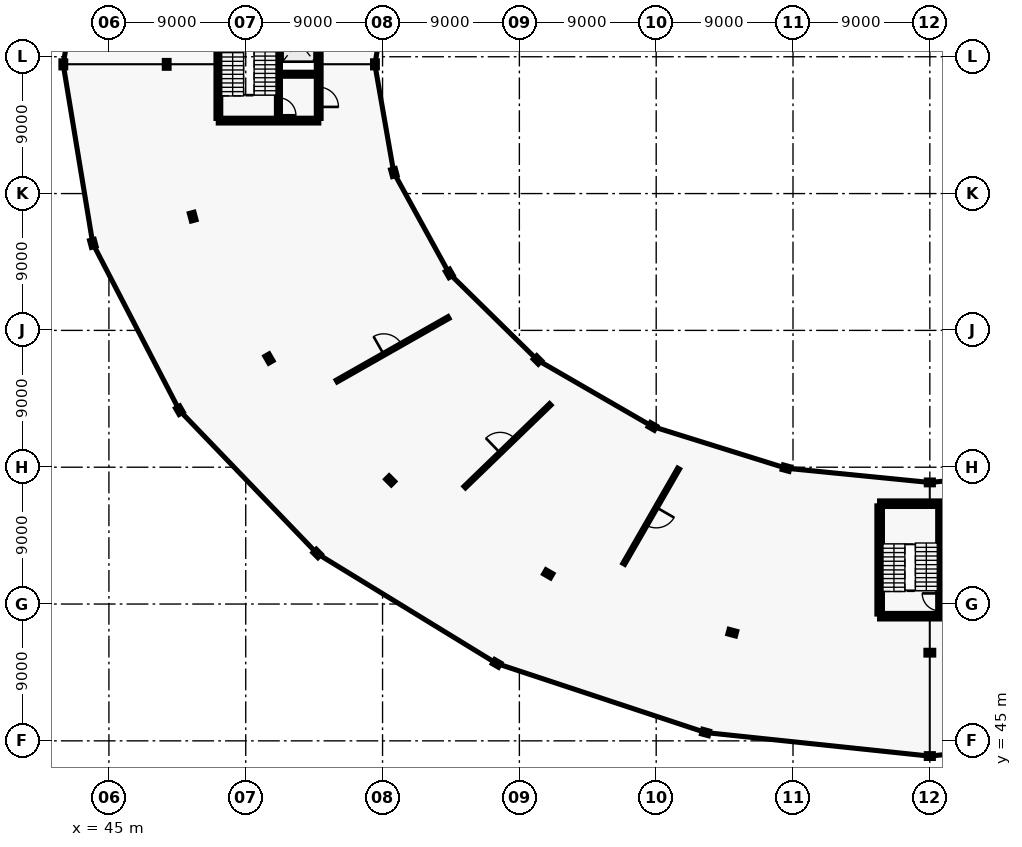
"""IFC4 building model, lengths in metres.
Left out: names, types, materials, properties, quantities, classifications, styles, units other than length and angle.
Written with IfcOpenShell. Run it as: python <this file> out.ifc"""

import sys

from ifc_helpers import new_model, si_unit, direction, frame, frame_2d, origin, origin_2d, place, context, subcontext, project, spatial, rectangle, i_section, extrude, element, fill, save


model = new_model("IFC4")
c1 = context("Model", 3, precision=1e-05, world=origin(), true_north=direction((0.0, 1.0)))
c2 = subcontext(c1, "Body", "Model", "MODEL_VIEW")
j1 = project(units=[si_unit("LENGTHUNIT", "METRE"), si_unit("PLANEANGLEUNIT", "RADIAN")], contexts=[c1])
p1 = place(None, origin())
s1 = spatial("IfcSite", under=j1, at=p1, CompositionType="ELEMENT")
p2 = place(p1, origin())
s2 = spatial("IfcBuilding", under=s1, at=p2, CompositionType="ELEMENT")
p3 = place(p2, frame((0.0, 0.0, 5.4)))
s3 = spatial("IfcBuildingStorey", under=s2, at=p3, CompositionType="ELEMENT", Elevation=5.4)
p4 = place(p3, frame((62.5, 89.5, 0.0), z_axis=(0.0, 0.0, 1.0), x_axis=(-1.0, 0.0, 0.0)))
e1 = element("IfcColumn", 1, at=p4, inside=s3, PredefinedType="COLUMN", context=c2, shape_type="SweptSolid", body=[
    extrude(i_section(OverallWidth=0.3, OverallDepth=0.45, WebThickness=0.014, FlangeThickness=0.026, FilletRadius=0.027, at=origin_2d()), origin(), (0.0, 0.0, 1.0), 4.2),
])
p5 = place(p3, frame((48.8, 89.5, 0.0), z_axis=(0.0, 0.0, 1.0), x_axis=(-1.0, 0.0, 0.0)))
e2 = element("IfcColumn", 2, at=p5, inside=s3, PredefinedType="COLUMN", context=c2, shape_type="SweptSolid", body=[
    extrude(i_section(OverallWidth=0.3, OverallDepth=0.5, WebThickness=0.014, FlangeThickness=0.028, FilletRadius=0.027, at=origin_2d()), origin(), (0.0, 0.0, 1.0), 4.2),
])
p6 = place(p3, frame((42.0, 89.5, 0.0), z_axis=(0.0, 0.0, 1.0), x_axis=(-1.0, 0.0, 0.0)))
e3 = element("IfcColumn", 3, at=p6, inside=s3, PredefinedType="COLUMN", context=c2, shape_type="SweptSolid", body=[
    extrude(i_section(OverallWidth=0.3, OverallDepth=0.45, WebThickness=0.014, FlangeThickness=0.026, FilletRadius=0.027, at=origin_2d()), origin(), (0.0, 0.0, 1.0), 4.18),
])
p7 = place(p3, frame((63.744, 82.382, 0.0), z_axis=(0.0, 0.0, 1.0), x_axis=(-0.965925826289, -0.258819045103, 0.0)))
e4 = element("IfcColumn", 4, at=p7, inside=s3, PredefinedType="COLUMN", context=c2, shape_type="SweptSolid", body=[
    extrude(i_section(OverallWidth=0.3, OverallDepth=0.45, WebThickness=0.014, FlangeThickness=0.026, FilletRadius=0.027, at=origin_2d()), origin(), (0.0, 0.0, 1.0), 4.2),
])
p8 = place(p3, frame((50.511, 79.484, 0.0), z_axis=(0.0, 0.0, 1.0), x_axis=(-0.965925826289, -0.258819045103, 0.0)))
e5 = element("IfcColumn", 5, at=p8, inside=s3, PredefinedType="COLUMN", context=c2, shape_type="SweptSolid", body=[
    extrude(i_section(OverallWidth=0.3, OverallDepth=0.5, WebThickness=0.014, FlangeThickness=0.028, FilletRadius=0.027, at=origin_2d()), origin(), (0.0, 0.0, 1.0), 4.2),
])
p9 = place(p3, frame((43.942, 77.724, 0.0), z_axis=(0.0, 0.0, 1.0), x_axis=(-0.965925826289, -0.258819045103, 0.0)))
e6 = element("IfcColumn", 6, at=p9, inside=s3, PredefinedType="COLUMN", context=c2, shape_type="SweptSolid", body=[
    extrude(i_section(OverallWidth=0.3, OverallDepth=0.45, WebThickness=0.014, FlangeThickness=0.026, FilletRadius=0.027, at=origin_2d()), origin(), (0.0, 0.0, 1.0), 4.18),
])
p10 = place(p3, frame((67.39, 75.75, 0.0), z_axis=(0.0, 0.0, 1.0), x_axis=(-0.866025403784, -0.5, 0.0)))
e7 = element("IfcColumn", 7, at=p10, inside=s3, PredefinedType="COLUMN", context=c2, shape_type="SweptSolid", body=[
    extrude(i_section(OverallWidth=0.3, OverallDepth=0.45, WebThickness=0.014, FlangeThickness=0.026, FilletRadius=0.027, at=origin_2d()), origin(), (0.0, 0.0, 1.0), 4.2),
])
p11 = place(p3, frame((55.526, 70.15, 0.0), z_axis=(0.0, 0.0, 1.0), x_axis=(-0.866025403784, -0.5, 0.0)))
e8 = element("IfcColumn", 8, at=p11, inside=s3, PredefinedType="COLUMN", context=c2, shape_type="SweptSolid", body=[
    extrude(i_section(OverallWidth=0.3, OverallDepth=0.5, WebThickness=0.014, FlangeThickness=0.028, FilletRadius=0.027, at=origin_2d()), origin(), (0.0, 0.0, 1.0), 4.2),
])
p12 = place(p3, frame((49.637, 66.75, 0.0), z_axis=(0.0, 0.0, 1.0), x_axis=(-0.866025403784, -0.5, 0.0)))
e9 = element("IfcColumn", 9, at=p12, inside=s3, PredefinedType="COLUMN", context=c2, shape_type="SweptSolid", body=[
    extrude(i_section(OverallWidth=0.3, OverallDepth=0.45, WebThickness=0.014, FlangeThickness=0.026, FilletRadius=0.027, at=origin_2d()), origin(), (0.0, 0.0, 1.0), 4.18),
])
p13 = place(p3, frame((73.191, 70.055, 0.0), z_axis=(0.0, 0.0, 1.0), x_axis=(-0.707106781187, -0.707106781187, 0.0)))
e10 = element("IfcColumn", 10, at=p13, inside=s3, PredefinedType="COLUMN", context=c2, shape_type="SweptSolid", body=[
    extrude(i_section(OverallWidth=0.3, OverallDepth=0.45, WebThickness=0.014, FlangeThickness=0.026, FilletRadius=0.027, at=origin_2d()), origin(), (0.0, 0.0, 1.0), 4.2),
])
p14 = place(p3, frame((63.503, 62.135, 0.0), z_axis=(0.0, 0.0, 1.0), x_axis=(-0.707106781187, -0.707106781187, 0.0)))
e11 = element("IfcColumn", 11, at=p14, inside=s3, PredefinedType="COLUMN", context=c2, shape_type="SweptSolid", body=[
    extrude(i_section(OverallWidth=0.3, OverallDepth=0.5, WebThickness=0.014, FlangeThickness=0.028, FilletRadius=0.027, at=origin_2d()), origin(), (0.0, 0.0, 1.0), 4.2),
])
p15 = place(p3, frame((58.695, 57.327, 0.0), z_axis=(0.0, 0.0, 1.0), x_axis=(-0.707106781187, -0.707106781187, 0.0)))
e12 = element("IfcColumn", 12, at=p15, inside=s3, PredefinedType="COLUMN", context=c2, shape_type="SweptSolid", body=[
    extrude(i_section(OverallWidth=0.3, OverallDepth=0.45, WebThickness=0.014, FlangeThickness=0.026, FilletRadius=0.027, at=origin_2d()), origin(), (0.0, 0.0, 1.0), 4.18),
])
p16 = place(p3, frame((80.75, 65.684, 0.0), z_axis=(0.0, 0.0, 1.0), x_axis=(-0.5, -0.866025403784, 0.0)))
e13 = element("IfcColumn", 13, at=p16, inside=s3, PredefinedType="COLUMN", context=c2, shape_type="SweptSolid", body=[
    extrude(i_section(OverallWidth=0.3, OverallDepth=0.45, WebThickness=0.014, FlangeThickness=0.026, FilletRadius=0.027, at=origin_2d()), origin(), (0.0, 0.0, 1.0), 4.2),
])
p17 = place(p3, frame((73.9, 55.985, 0.0), z_axis=(0.0, 0.0, 1.0), x_axis=(-0.5, -0.866025403784, 0.0)))
e14 = element("IfcColumn", 14, at=p17, inside=s3, PredefinedType="COLUMN", context=c2, shape_type="SweptSolid", body=[
    extrude(i_section(OverallWidth=0.3, OverallDepth=0.5, WebThickness=0.014, FlangeThickness=0.028, FilletRadius=0.027, at=origin_2d()), origin(), (0.0, 0.0, 1.0), 4.2),
])
p18 = place(p3, frame((70.5, 50.096, 0.0), z_axis=(0.0, 0.0, 1.0), x_axis=(-0.5, -0.866025403784, 0.0)))
e15 = element("IfcColumn", 15, at=p18, inside=s3, PredefinedType="COLUMN", context=c2, shape_type="SweptSolid", body=[
    extrude(i_section(OverallWidth=0.3, OverallDepth=0.45, WebThickness=0.014, FlangeThickness=0.026, FilletRadius=0.027, at=origin_2d()), origin(), (0.0, 0.0, 1.0), 4.18),
])
p19 = place(p3, frame((89.553, 62.937, 0.0), z_axis=(0.0, 0.0, 1.0), x_axis=(-0.258819045103, -0.965925826289, 0.0)))
e16 = element("IfcColumn", 16, at=p19, inside=s3, PredefinedType="COLUMN", context=c2, shape_type="SweptSolid", body=[
    extrude(i_section(OverallWidth=0.3, OverallDepth=0.45, WebThickness=0.014, FlangeThickness=0.026, FilletRadius=0.027, at=origin_2d()), origin(), (0.0, 0.0, 1.0), 4.2),
])
p20 = place(p3, frame((86.007, 52.119, 0.0), z_axis=(0.0, 0.0, 1.0), x_axis=(-0.258819045103, -0.965925826289, 0.0)))
e17 = element("IfcColumn", 17, at=p20, inside=s3, PredefinedType="COLUMN", context=c2, shape_type="SweptSolid", body=[
    extrude(i_section(OverallWidth=0.3, OverallDepth=0.5, WebThickness=0.014, FlangeThickness=0.028, FilletRadius=0.027, at=origin_2d()), origin(), (0.0, 0.0, 1.0), 4.2),
])
p21 = place(p3, frame((84.247, 45.55, 0.0), z_axis=(0.0, 0.0, 1.0), x_axis=(-0.258819045103, -0.965925826289, 0.0)))
e18 = element("IfcColumn", 18, at=p21, inside=s3, PredefinedType="COLUMN", context=c2, shape_type="SweptSolid", body=[
    extrude(i_section(OverallWidth=0.3, OverallDepth=0.45, WebThickness=0.014, FlangeThickness=0.026, FilletRadius=0.027, at=origin_2d()), origin(), (0.0, 0.0, 1.0), 4.18),
])
p22 = place(p3, frame((99.0, 62.0, 0.0), z_axis=(0.0, 0.0, 1.0), x_axis=(0.0, -1.0, 0.0)))
e19 = element("IfcColumn", 19, at=p22, inside=s3, PredefinedType="COLUMN", context=c2, shape_type="SweptSolid", body=[
    extrude(i_section(OverallWidth=0.3, OverallDepth=0.45, WebThickness=0.014, FlangeThickness=0.026, FilletRadius=0.027, at=origin_2d()), origin(), (0.0, 0.0, 1.0), 4.2),
])
p23 = place(p3, frame((99.0, 50.8, 0.0), z_axis=(0.0, 0.0, 1.0), x_axis=(0.0, -1.0, 0.0)))
e20 = element("IfcColumn", 20, at=p23, inside=s3, PredefinedType="COLUMN", context=c2, shape_type="SweptSolid", body=[
    extrude(i_section(OverallWidth=0.3, OverallDepth=0.5, WebThickness=0.014, FlangeThickness=0.028, FilletRadius=0.027, at=origin_2d()), origin(), (0.0, 0.0, 1.0), 4.2),
])
p24 = place(p3, frame((99.0, 44.0, 0.0), z_axis=(0.0, 0.0, 1.0), x_axis=(0.0, -1.0, 0.0)))
e21 = element("IfcColumn", 21, at=p24, inside=s3, PredefinedType="COLUMN", context=c2, shape_type="SweptSolid", body=[
    extrude(i_section(OverallWidth=0.3, OverallDepth=0.45, WebThickness=0.014, FlangeThickness=0.026, FilletRadius=0.027, at=origin_2d()), origin(), (0.0, 0.0, 1.0), 4.18),
])
p25 = place(p3, frame((52.2, 85.8, 0.0), z_axis=(0.0, 0.0, 1.0), x_axis=(1.0, 0.0, 0.0)))
e22 = element("IfcWall", 22, at=p25, inside=s3, PredefinedType="SHEAR", context=c2, shape_type="SweptSolid", body=[
    extrude(rectangle(XDim=6.6, YDim=0.3, at=frame_2d((3.3, 0.0))), origin(), (0.0, 0.0, 1.0), 4.2),
])
p26 = place(p3, frame((52.2, 85.95, 0.0), z_axis=(0.0, 0.0, 1.0), x_axis=(0.0, 1.0, 0.0)))
e23 = element("IfcWall", 23, at=p26, inside=s3, PredefinedType="SHEAR", context=c2, shape_type="SweptSolid", body=[
    extrude(rectangle(XDim=7.1, YDim=0.3, at=frame_2d((3.55, 0.0))), origin(), (0.0, 0.0, 1.0), 4.2),
])
p27 = place(p3, frame((58.8, 85.95, 0.0), z_axis=(0.0, 0.0, 1.0), x_axis=(0.0, 1.0, 0.0)))
e24 = element("IfcWall", 24, at=p27, inside=s3, PredefinedType="SHEAR", context=c2, shape_type="SweptSolid", body=[
    extrude(rectangle(XDim=7.1, YDim=0.3, at=frame_2d((3.55, 0.0))), origin(), (0.0, 0.0, 1.0), 4.2),
])
p28 = place(p27, frame((0.75, 0.0, 0.0)))
e25 = element("IfcOpeningElement", 25, at=p28, cuts=e24, PredefinedType="OPENING", context=c2, shape_type="SweptSolid", body=[
    extrude(rectangle(XDim=1.3, YDim=2.15, at=frame_2d((0.65, 1.075))), frame((0.0, 0.16, 0.0), z_axis=(0.0, -1.0, 0.0), x_axis=(1.0, 0.0, 0.0)), (0.0, 0.0, 1.0), 0.32),
])
p29 = place(p3, frame((56.15, 85.95, 0.0), z_axis=(0.0, 0.0, 1.0), x_axis=(0.0, 1.0, 0.0)))
e26 = element("IfcWall", 26, at=p29, inside=s3, PredefinedType="SHEAR", context=c2, shape_type="SweptSolid", body=[
    extrude(rectangle(XDim=7.1, YDim=0.25, at=frame_2d((3.55, 0.0))), origin(), (0.0, 0.0, 1.0), 4.2),
])
p30 = place(p29, frame((0.2, 0.0, 0.0)))
e27 = element("IfcOpeningElement", 27, at=p30, cuts=e26, PredefinedType="OPENING", context=c2, shape_type="SweptSolid", body=[
    extrude(rectangle(XDim=1.15, YDim=2.15, at=frame_2d((0.575, 1.075))), frame((0.0, 0.135, 0.0), z_axis=(0.0, -1.0, 0.0), x_axis=(1.0, 0.0, 0.0)), (0.0, 0.0, 1.0), 0.27),
])
p31 = place(p3, frame((56.27, 88.85, 0.0), z_axis=(0.0, 0.0, 1.0), x_axis=(1.0, 0.0, 0.0)))
e28 = element("IfcWall", 28, at=p31, inside=s3, PredefinedType="SHEAR", context=c2, shape_type="SweptSolid", body=[
    extrude(rectangle(XDim=2.38, YDim=0.25, at=frame_2d((1.19, 0.0))), origin(), (0.0, 0.0, 1.0), 4.2),
])
p32 = place(p31, frame((0.39, 0.0, 0.0)))
e29 = element("IfcOpeningElement", 29, at=p32, cuts=e28, PredefinedType="OPENING", context=c2, shape_type="SweptSolid", body=[
    extrude(rectangle(XDim=1.6, YDim=2.3, at=frame_2d((0.8, 1.15))), frame((0.0, 0.135, 0.0), z_axis=(0.0, -1.0, 0.0), x_axis=(1.0, 0.0, 0.0)), (0.0, 0.0, 1.0), 0.27),
])
for number, where, z_axis, x_axis in (
    (30, (95.7, 53.2, 0.0), (0.0, 0.0, 1.0), (1.0, 0.0, 0.0)),
    (31, (95.7, 60.6, 0.0), (0.0, 0.0, 1.0), (1.0, 0.0, 0.0)),
):
    element("IfcWall", number, at=place(p3, frame(where, z_axis=z_axis, x_axis=x_axis)), inside=s3, PredefinedType="SHEAR", context=c2, shape_type="SweptSolid", body=[
        extrude(rectangle(XDim=6.6, YDim=0.35, at=frame_2d((3.3, 0.0))), origin(), (0.0, 0.0, 1.0), 4.2),
    ])
p33 = place(p3, frame((95.7, 53.35, 0.0), z_axis=(0.0, 0.0, 1.0), x_axis=(0.0, 1.0, 0.0)))
e32 = element("IfcWall", 32, at=p33, inside=s3, PredefinedType="SHEAR", context=c2, shape_type="SweptSolid", body=[
    extrude(rectangle(XDim=7.1, YDim=0.35, at=frame_2d((3.55, 0.0))), origin(), (0.0, 0.0, 1.0), 4.2),
])
p34 = place(p3, frame((99.65, 53.35, 0.0), z_axis=(0.0, 0.0, 1.0), x_axis=(0.0, 1.0, 0.0)))
e33 = element("IfcWall", 33, at=p34, inside=s3, PredefinedType="SHEAR", context=c2, shape_type="SweptSolid", body=[
    extrude(rectangle(XDim=7.1, YDim=0.25, at=frame_2d((3.55, 0.0))), origin(), (0.0, 0.0, 1.0), 4.2),
])
p35 = place(p34, frame((0.2, 0.0, 0.0)))
e34 = element("IfcOpeningElement", 34, at=p35, cuts=e33, PredefinedType="OPENING", context=c2, shape_type="SweptSolid", body=[
    extrude(rectangle(XDim=1.15, YDim=2.15, at=frame_2d((0.575, 1.075))), frame((0.0, 0.135, 0.0), z_axis=(0.0, -1.0, 0.0), x_axis=(1.0, 0.0, 0.0)), (0.0, 0.0, 1.0), 0.27),
])
p36 = place(p3, frame((67.333, 72.841, 0.0), z_axis=(0.0, 0.0, 1.0), x_axis=(-0.869564093622, -0.493820095869, 0.0)))
e35 = element("IfcWall", 35, at=p36, inside=s3, PredefinedType="PARTITIONING", context=c2, shape_type="SweptSolid", body=[
    extrude(rectangle(XDim=8.442, YDim=0.12, at=frame_2d((4.221, 0.0))), origin(), (0.0, 0.0, 1.0), 3.2),
])
p37 = place(p36, frame((3.546, 0.0, 0.0)))
e36 = element("IfcOpeningElement", 36, at=p37, cuts=e35, PredefinedType="OPENING", context=c2, shape_type="SweptSolid", body=[
    extrude(rectangle(XDim=1.35, YDim=2.2, at=frame_2d((0.675, 1.1))), frame((0.0, 0.07, 0.0), z_axis=(0.0, -1.0, 0.0), x_axis=(1.0, 0.0, 0.0)), (0.0, 0.0, 1.0), 0.14),
])
p38 = place(p3, frame((74.028, 67.127, 0.0), z_axis=(0.0, 0.0, 1.0), x_axis=(-0.718851460144, -0.695163706078, 0.0)))
e37 = element("IfcWall", 37, at=p38, inside=s3, PredefinedType="PARTITIONING", context=c2, shape_type="SweptSolid", body=[
    extrude(rectangle(XDim=7.812, YDim=0.12, at=frame_2d((3.906, 0.0))), origin(), (0.0, 0.0, 1.0), 3.2),
])
p39 = place(p38, frame((3.231, 0.0, 0.0)))
e38 = element("IfcOpeningElement", 38, at=p39, cuts=e37, PredefinedType="OPENING", context=c2, shape_type="SweptSolid", body=[
    extrude(rectangle(XDim=1.35, YDim=2.2, at=frame_2d((0.675, 1.1))), frame((0.0, 0.07, 0.0), z_axis=(0.0, -1.0, 0.0), x_axis=(1.0, 0.0, 0.0)), (0.0, 0.0, 1.0), 0.14),
])
p40 = place(p3, frame((82.469, 62.899, 0.0), z_axis=(0.0, 0.0, 1.0), x_axis=(-0.499109384588, -0.866538990592, 0.0)))
e39 = element("IfcWall", 39, at=p40, inside=s3, PredefinedType="PARTITIONING", context=c2, shape_type="SweptSolid", body=[
    extrude(rectangle(XDim=7.207, YDim=0.12, at=frame_2d((3.604, 0.0))), origin(), (0.0, 0.0, 1.0), 3.2),
])
p41 = place(p40, frame((2.928, 0.0, 0.0)))
e40 = element("IfcOpeningElement", 40, at=p41, cuts=e39, PredefinedType="OPENING", context=c2, shape_type="SweptSolid", body=[
    extrude(rectangle(XDim=1.35, YDim=2.2, at=frame_2d((0.675, 1.1))), frame((0.0, 0.07, 0.0), z_axis=(0.0, -1.0, 0.0), x_axis=(1.0, 0.0, 0.0)), (0.0, 0.0, 1.0), 0.14),
])
p42 = place(p28, frame((1.3, 0.0, 0.0), z_axis=(0.0, 0.0, 1.0), x_axis=(-1.0, 0.0, 0.0)))
e41 = element("IfcDoor", 41, at=p42, inside=s3, OperationType="DOUBLE_DOOR_SINGLE_SWING", PredefinedType="DOOR", context=c2, shape_type="SweptSolid", body=[
    extrude(rectangle(XDim=1.3, YDim=2.15, at=frame_2d((0.65, 1.075))), frame((0.0, 0.025, 0.0), z_axis=(0.0, -1.0, 0.0), x_axis=(1.0, 0.0, 0.0)), (0.0, 0.0, 1.0), 0.05),
])
fill(e25, e41)
p43 = place(p30, frame((1.15, 0.0, 0.0), z_axis=(0.0, 0.0, 1.0), x_axis=(-1.0, 0.0, 0.0)))
e42 = element("IfcDoor", 42, at=p43, inside=s3, OperationType="SINGLE_SWING_LEFT", PredefinedType="DOOR", context=c2, shape_type="SweptSolid", body=[
    extrude(rectangle(XDim=1.15, YDim=2.15, at=frame_2d((0.575, 1.075))), frame((0.0, 0.025, 0.0), z_axis=(0.0, -1.0, 0.0), x_axis=(1.0, 0.0, 0.0)), (0.0, 0.0, 1.0), 0.05),
])
fill(e27, e42)
p44 = place(p32, origin())
e43 = element("IfcDoor", 43, at=p44, inside=s3, OperationType="SLIDING_TO_LEFT", PredefinedType="DOOR", context=c2, shape_type="SweptSolid", body=[
    extrude(rectangle(XDim=1.6, YDim=2.3, at=frame_2d((0.8, 1.15))), frame((0.0, 0.025, 0.0), z_axis=(0.0, -1.0, 0.0), x_axis=(1.0, 0.0, 0.0)), (0.0, 0.0, 1.0), 0.05),
])
fill(e29, e43)
p45 = place(p35, frame((1.15, 0.0, 0.0), z_axis=(0.0, 0.0, 1.0), x_axis=(-1.0, 0.0, 0.0)))
e44 = element("IfcDoor", 44, at=p45, inside=s3, OperationType="SINGLE_SWING_RIGHT", PredefinedType="DOOR", context=c2, shape_type="SweptSolid", body=[
    extrude(rectangle(XDim=1.15, YDim=2.15, at=frame_2d((0.575, 1.075))), frame((0.0, 0.025, 0.0), z_axis=(0.0, -1.0, 0.0), x_axis=(1.0, 0.0, 0.0)), (0.0, 0.0, 1.0), 0.05),
])
fill(e34, e44)
p46 = place(p37, origin())
e45 = element("IfcDoor", 45, at=p46, inside=s3, OperationType="SINGLE_SWING_RIGHT", PredefinedType="DOOR", context=c2, shape_type="SweptSolid", body=[
    extrude(rectangle(XDim=1.35, YDim=2.2, at=frame_2d((0.675, 1.1))), frame((0.0, 0.025, 0.0), z_axis=(0.0, -1.0, 0.0), x_axis=(1.0, 0.0, 0.0)), (0.0, 0.0, 1.0), 0.05),
])
fill(e36, e45)
p47 = place(p39, origin())
e46 = element("IfcDoor", 46, at=p47, inside=s3, OperationType="SINGLE_SWING_RIGHT", PredefinedType="DOOR", context=c2, shape_type="SweptSolid", body=[
    extrude(rectangle(XDim=1.35, YDim=2.2, at=frame_2d((0.675, 1.1))), frame((0.0, 0.025, 0.0), z_axis=(0.0, -1.0, 0.0), x_axis=(1.0, 0.0, 0.0)), (0.0, 0.0, 1.0), 0.05),
])
fill(e38, e46)
p48 = place(p41, origin())
e47 = element("IfcDoor", 47, at=p48, inside=s3, OperationType="SINGLE_SWING_LEFT", PredefinedType="DOOR", context=c2, shape_type="SweptSolid", body=[
    extrude(rectangle(XDim=1.35, YDim=2.2, at=frame_2d((0.675, 1.1))), frame((0.0, 0.025, 0.0), z_axis=(0.0, -1.0, 0.0), x_axis=(1.0, 0.0, 0.0)), (0.0, 0.0, 1.0), 0.05),
])
fill(e40, e47)
save(model, sys.argv[1])
